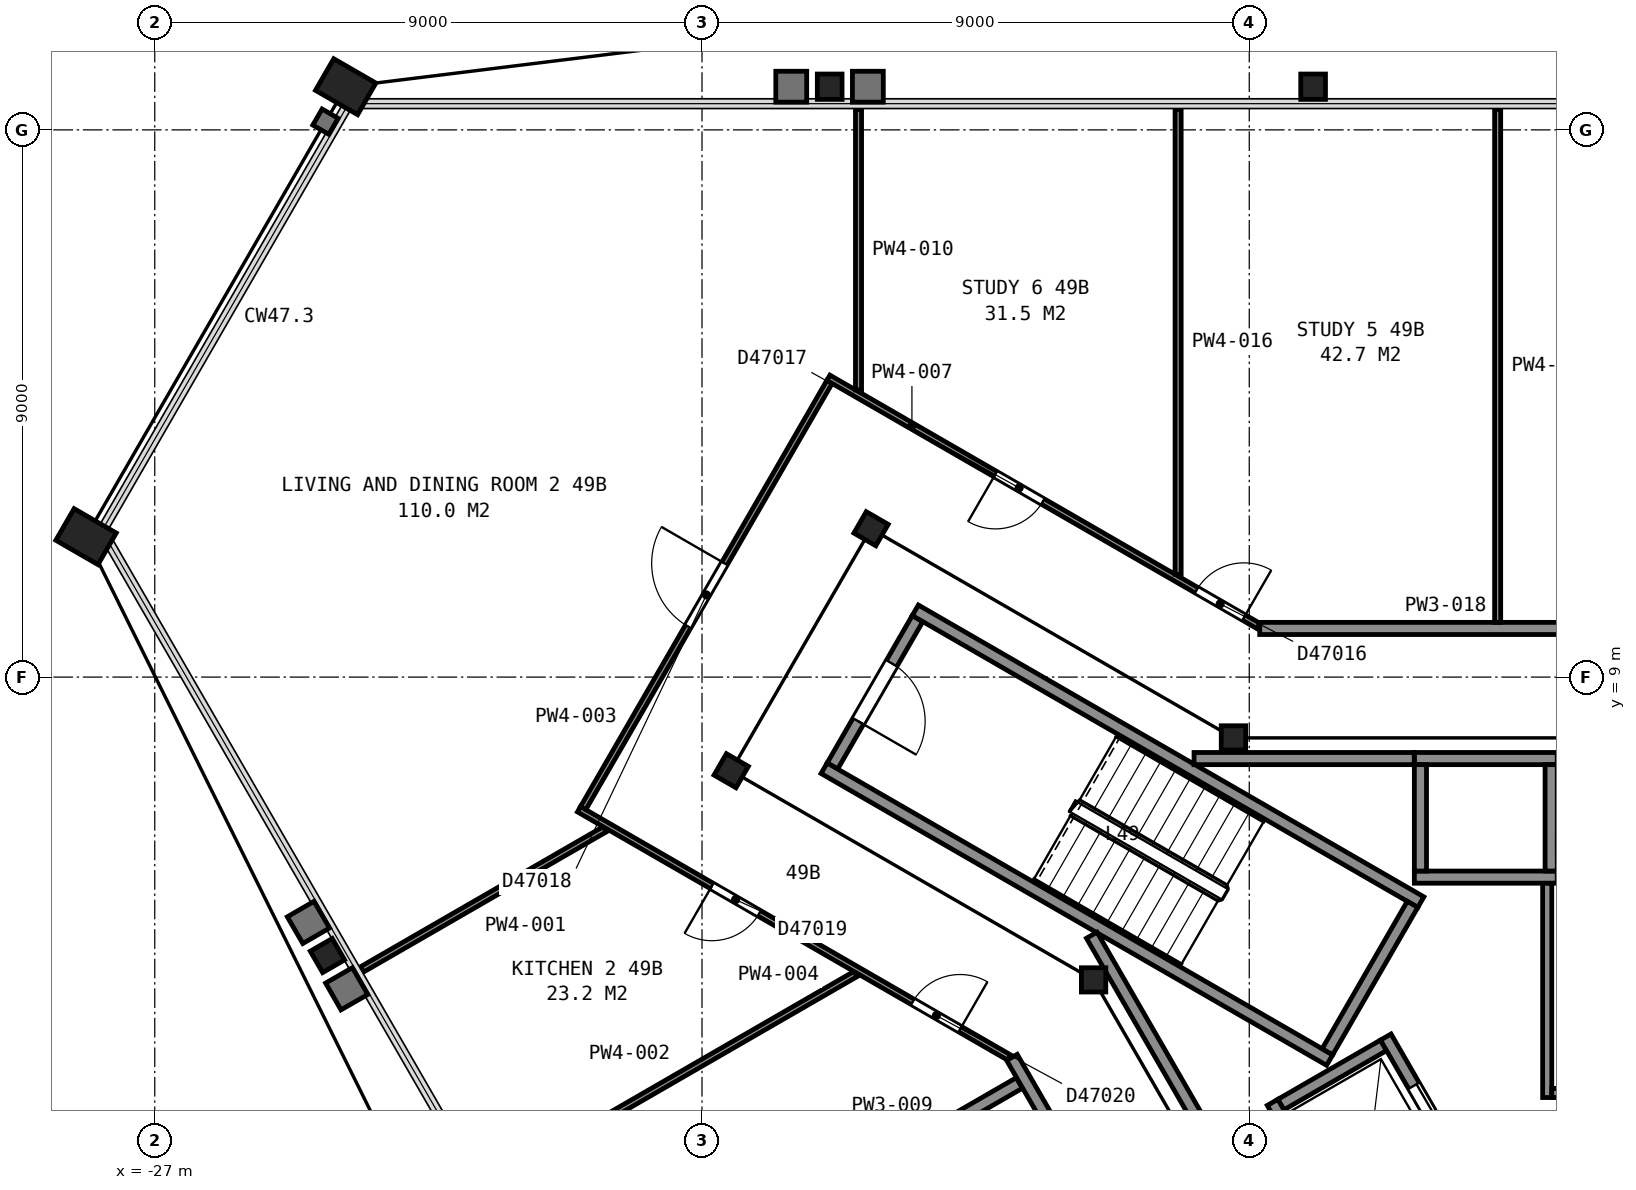
"""IFC4 building model, lengths in metres.
Left out: names, types, materials, properties, quantities, classifications, styles, units other than length and angle.
Written with IfcOpenShell. Run it as: python <this file> out.ifc"""

import sys

from ifc_helpers import new_model, si_unit, direction, frame, frame_2d, origin, origin_2d, place, context, subcontext, project, spatial, rectangle, hollow_rectangle, i_section, extrude, element, fill, save


model = new_model("IFC4")
c1 = context("Model", 3, precision=1e-05, world=origin(), true_north=direction((0.0, 1.0)))
c2 = subcontext(c1, "Body", "Model", "MODEL_VIEW")
j1 = project(units=[si_unit("LENGTHUNIT", "METRE"), si_unit("PLANEANGLEUNIT", "RADIAN")], contexts=[c1])
p1 = place(None, origin())
s1 = spatial("IfcSite", under=j1, at=p1, CompositionType="ELEMENT")
p2 = place(p1, origin())
s2 = spatial("IfcBuilding", under=s1, at=p2, CompositionType="ELEMENT")
p3 = place(p2, frame((0.0, 0.0, 196.9)))
s3 = spatial("IfcBuildingStorey", under=s2, at=p3, CompositionType="ELEMENT", Elevation=196.9)
for number, where, z_axis, x_axis in (
    (1, (-7.95, 18.71, 0.0), (0.0, 0.0, 1.0), (1.0, 0.0, 0.0)),
    (2, (-15.9, 18.71, 0.0), (0.0, 0.0, 1.0), (1.0, 0.0, 0.0)),
):
    element("IfcColumn", number, at=place(p3, frame(where, z_axis=z_axis, x_axis=x_axis)), inside=s3, PredefinedType="COLUMN", context=c2, shape_type="SweptSolid", body=[
        extrude(i_section(OverallWidth=0.406, OverallDepth=0.417, WebThickness=0.03, FlangeThickness=0.048, FilletRadius=0.015, at=origin_2d()), origin(), (0.0, 0.0, 1.0), 3.01),
    ])
for number, where, z_axis, x_axis in (
    (3, (-23.86, 18.71, 0.0), (0.0, 0.0, 1.0), (0.5, 0.866, 0.0)),
    (4, (-28.13, 11.31, 0.0), (0.0, 0.0, 1.0), (0.5, 0.866, 0.0)),
):
    element("IfcColumn", number, at=place(p3, frame(where, z_axis=z_axis, x_axis=x_axis)), inside=s3, PredefinedType="COLUMN", context=c2, shape_type="SweptSolid", body=[
        extrude(hollow_rectangle(XDim=0.6, YDim=0.8, WallThickness=0.05, at=origin_2d()), origin(), (0.0, 0.0, 1.0), 3.7),
    ])
p4 = place(p3, frame((-24.16, 4.42, 0.0), z_axis=(0.0, 0.0, 1.0), x_axis=(-0.5, 0.866025403784, 0.0)))
e5 = element("IfcColumn", 5, at=p4, inside=s3, PredefinedType="COLUMN", context=c2, shape_type="SweptSolid", body=[
    extrude(i_section(OverallWidth=0.406, OverallDepth=0.417, WebThickness=0.03, FlangeThickness=0.048, FilletRadius=0.015, at=origin_2d()), origin(), (0.0, 0.0, 1.0), 3.01),
])
p5 = place(p3, frame((-9.26, 8.0, 0.0), z_axis=(0.0, 0.0, 1.0), x_axis=(1.0, 0.0, 0.0)))
e6 = element("IfcColumn", 6, at=p5, inside=s3, PredefinedType="COLUMN", context=c2, shape_type="SweptSolid", body=[
    extrude(i_section(OverallWidth=0.401, OverallDepth=0.399, WebThickness=0.025, FlangeThickness=0.04, FilletRadius=0.015, at=origin_2d()), origin(), (0.0, 0.0, 1.0), 3.7),
])
for number, where, z_axis, x_axis in (
    (7, (-15.22, 11.44, 0.0), (0.0, 0.0, 1.0), (0.5, 0.866, 0.0)),
    (8, (-17.52, 7.46, 0.0), (0.0, 0.0, 1.0), (0.5, 0.866, 0.0)),
):
    element("IfcColumn", number, at=place(p3, frame(where, z_axis=z_axis, x_axis=x_axis)), inside=s3, PredefinedType="COLUMN", context=c2, shape_type="SweptSolid", body=[
        extrude(i_section(OverallWidth=0.406, OverallDepth=0.417, WebThickness=0.03, FlangeThickness=0.048, FilletRadius=0.015, at=origin_2d()), origin(), (0.0, 0.0, 1.0), 3.7),
    ])
p6 = place(p3, frame((-11.56, 4.02, 0.0), z_axis=(0.0, 0.0, 1.0), x_axis=(1.0, 0.0, 0.0)))
e9 = element("IfcColumn", 9, at=p6, inside=s3, PredefinedType="COLUMN", context=c2, shape_type="SweptSolid", body=[
    extrude(i_section(OverallWidth=0.401, OverallDepth=0.399, WebThickness=0.025, FlangeThickness=0.04, FilletRadius=0.015, at=origin_2d()), origin(), (0.0, 0.0, 1.0), 3.7),
])
p7 = place(p3, frame((-14.455, 9.962, 0.0), z_axis=(0.0, 0.0, 1.0), x_axis=(-0.500049511043, -0.865996816683, 0.0)))
e10 = element("IfcWall", 10, at=p7, inside=s3, PredefinedType="PARTITIONING", context=c2, shape_type="SweptSolid", body=[
    extrude(rectangle(XDim=2.8, YDim=0.2, at=frame_2d((1.4, 0.0))), origin(), (0.0, 0.0, 1.0), 3.45),
])
p8 = place(p7, frame((0.85, 0.0, 0.0)))
e11 = element("IfcOpeningElement", 11, at=p8, cuts=e10, PredefinedType="OPENING", context=c2, shape_type="SweptSolid", body=[
    extrude(rectangle(XDim=1.1, YDim=2.1, at=frame_2d((0.55, 1.05))), frame((0.0, 0.11, 0.0), z_axis=(0.0, -1.0, 0.0), x_axis=(1.0, 0.0, 0.0)), (0.0, 0.0, 1.0), 0.22),
])
for number, where, z_axis, x_axis in (
    (12, (-7.678, 2.701, 0.0), (0.0, 0.0, 1.0), (-0.866, 0.5, 0.0)),
    (13, (-6.178, 5.299, 0.0), (0.0, 0.0, 1.0), (-0.866, 0.5, 0.0)),
):
    element("IfcWall", number, at=place(p3, frame(where, z_axis=z_axis, x_axis=x_axis)), inside=s3, PredefinedType="PARTITIONING", context=c2, shape_type="SweptSolid", body=[
        extrude(rectangle(XDim=9.6, YDim=0.2, at=frame_2d((4.8, 0.0))), origin(), (0.0, 0.0, 1.0), 3.45),
    ])
p9 = place(p3, frame((-6.315, 5.262, 0.0), z_axis=(0.0, 0.0, 1.0), x_axis=(-0.500049511043, -0.865996816683, 0.0)))
e14 = element("IfcWall", 14, at=p9, inside=s3, PredefinedType="PARTITIONING", context=c2, shape_type="SweptSolid", body=[
    extrude(rectangle(XDim=2.8, YDim=0.2, at=frame_2d((1.4, 0.0))), origin(), (0.0, 0.0, 1.0), 3.45),
])
for number, where, z_axis, x_axis in (
    (15, (-6.285, 5.71, 0.0), (0.0, 0.0, 1.0), (1.0, 0.0, 0.0)),
    (16, (-6.285, 7.66, 0.0), (0.0, 0.0, 1.0), (1.0, 0.0, 0.0)),
):
    element("IfcWall", number, at=place(p3, frame(where, z_axis=z_axis, x_axis=x_axis)), inside=s3, PredefinedType="PARTITIONING", context=c2, shape_type="SweptSolid", body=[
        extrude(rectangle(XDim=2.35, YDim=0.2, at=frame_2d((1.175, 0.0))), origin(), (0.0, 0.0, 1.0), 3.7),
    ])
p10 = place(p3, frame((-8.48, 1.969, 0.0), z_axis=(0.0, 0.0, 1.0), x_axis=(0.866000020948, 0.500043961785, 0.0)))
e17 = element("IfcWall", 17, at=p10, inside=s3, PredefinedType="PARTITIONING", context=c2, shape_type="SweptSolid", body=[
    extrude(rectangle(XDim=1.95, YDim=0.2, at=frame_2d((0.975, 0.0))), origin(), (0.0, 0.0, 1.0), 3.7),
])
for number, where, z_axis, x_axis in (
    (18, (-4.035, 5.81, 0.0), (0.0, 0.0, 1.0), (0.0, 1.0, 0.0)),
    (19, (-6.185, 5.81, 0.0), (0.0, 0.0, 1.0), (0.0, 1.0, 0.0)),
):
    element("IfcWall", number, at=place(p3, frame(where, z_axis=z_axis, x_axis=x_axis)), inside=s3, PredefinedType="PARTITIONING", context=c2, shape_type="SweptSolid", body=[
        extrude(rectangle(XDim=1.75, YDim=0.2, at=frame_2d((0.875, 0.0))), origin(), (0.0, 0.0, 1.0), 3.7),
    ])
p11 = place(p3, frame((-5.28, 0.525, 0.0), z_axis=(0.0, 0.0, 1.0), x_axis=(-0.500037662692, 0.866003658127, 0.0)))
e20 = element("IfcWall", 20, at=p11, inside=s3, PredefinedType="PARTITIONING", context=c2, shape_type="SweptSolid", body=[
    extrude(rectangle(XDim=2.95, YDim=0.2, at=frame_2d((1.475, 0.0))), origin(), (0.0, 0.0, 1.0), 3.7),
])
p12 = place(p11, frame((0.925, 0.0, 0.0)))
e21 = element("IfcOpeningElement", 21, at=p12, cuts=e20, PredefinedType="OPENING", context=c2, shape_type="SweptSolid", body=[
    extrude(rectangle(XDim=1.1, YDim=2.1, at=frame_2d((0.55, 1.05))), frame((0.0, 0.11, 0.0), z_axis=(0.0, -1.0, 0.0), x_axis=(1.0, 0.0, 0.0)), (0.0, 0.0, 1.0), 0.22),
])
p13 = place(p3, frame((-7.242, -0.376, 0.0), z_axis=(0.0, 0.0, 1.0), x_axis=(-0.499996545922, 0.866027397988, 0.0)))
e22 = element("IfcWall", 22, at=p13, inside=s3, PredefinedType="PARTITIONING", context=c2, shape_type="SweptSolid", body=[
    extrude(rectangle(XDim=2.75, YDim=0.2, at=frame_2d((1.375, 0.0))), origin(), (0.0, 0.0, 1.0), 3.7),
])
p14 = place(p3, frame((-11.591, 4.755, 0.0), z_axis=(0.0, 0.0, 1.0), x_axis=(0.500043977787, -0.866000011708, 0.0)))
e23 = element("IfcWall", 23, at=p14, inside=s3, PredefinedType="PARTITIONING", context=c2, shape_type="SweptSolid", body=[
    extrude(rectangle(XDim=6.617, YDim=0.2, at=frame_2d((3.308, 0.0))), origin(), (0.0, 0.0, 1.0), 3.45),
])
p15 = place(p14, frame((3.695, 0.0, 0.0)))
e24 = element("IfcOpeningElement", 24, at=p15, cuts=e23, PredefinedType="OPENING", context=c2, shape_type="SweptSolid", body=[
    extrude(rectangle(XDim=1.8, YDim=2.1, at=frame_2d((0.9, 1.05))), frame((0.0, 0.11, 0.0), z_axis=(0.0, -1.0, 0.0), x_axis=(1.0, 0.0, 0.0)), (0.0, 0.0, 1.0), 0.22),
])
p16 = place(p3, frame((-9.908, 7.66, 0.0), z_axis=(0.0, 0.0, 1.0), x_axis=(1.0, 0.0, 0.0)))
e25 = element("IfcWall", 25, at=p16, inside=s3, PredefinedType="PARTITIONING", context=c2, shape_type="SweptSolid", body=[
    extrude(rectangle(XDim=3.621, YDim=0.2, at=frame_2d((1.811, 0.0))), origin(), (0.0, 0.0, 1.0), 3.45),
])
p17 = place(p3, frame((-4.1, 2.085, 0.0), z_axis=(0.0, 0.0, 1.0), x_axis=(0.0, 1.0, 0.0)))
e26 = element("IfcWall", 26, at=p17, inside=s3, PredefinedType="PARTITIONING", context=c2, shape_type="SweptSolid", body=[
    extrude(rectangle(XDim=3.523, YDim=0.15, at=frame_2d((1.761, 0.0))), origin(), (0.0, 0.0, 1.0), 3.45),
])
p18 = place(p3, frame((-4.025, 2.16, 0.0), z_axis=(0.0, 0.0, 1.0), x_axis=(1.0, 0.0, 0.0)))
e27 = element("IfcWall", 27, at=p18, inside=s3, PredefinedType="PARTITIONING", context=c2, shape_type="SweptSolid", body=[
    extrude(rectangle(XDim=1.238, YDim=0.15, at=frame_2d((0.619, 0.0))), origin(), (0.0, 0.0, 1.0), 3.45),
])
p19 = place(p3, frame((-23.592, 4.192, 0.0), z_axis=(0.0, 0.0, 1.0), x_axis=(0.866056775574, 0.499945658529, 0.0)))
e28 = element("IfcWall", 28, at=p19, inside=s3, PredefinedType="PARTITIONING", context=c2, shape_type="SweptSolid", body=[
    extrude(rectangle(XDim=4.608, YDim=0.1, at=frame_2d((2.304, 0.0))), origin(), (0.0, 0.0, 1.0), 2.362),
])
p20 = place(p3, frame((-21.53, 0.62, 0.0), z_axis=(0.0, 0.0, 1.0), x_axis=(0.865986079307, 0.500068105808, 0.0)))
e29 = element("IfcWall", 29, at=p20, inside=s3, PredefinedType="PARTITIONING", context=c2, shape_type="SweptSolid", body=[
    extrude(rectangle(XDim=6.99, YDim=0.1, at=frame_2d((3.495, 0.0))), origin(), (0.0, 0.0, 1.0), 2.362),
])
p21 = place(p3, frame((-19.955, 6.844, 0.0), z_axis=(0.0, 0.0, 1.0), x_axis=(0.500415732313, 0.865785247537, 0.0)))
e30 = element("IfcWall", 30, at=p21, inside=s3, PredefinedType="PARTITIONING", context=c2, shape_type="SweptSolid", body=[
    extrude(rectangle(XDim=8.097, YDim=0.1, at=frame_2d((4.049, 0.0))), origin(), (0.0, 0.0, 1.0), 2.362),
])
p22 = place(p21, frame((3.45, 0.0, 0.0)))
e31 = element("IfcOpeningElement", 31, at=p22, cuts=e30, PredefinedType="OPENING", context=c2, shape_type="SweptSolid", body=[
    extrude(rectangle(XDim=1.2, YDim=2.1, at=frame_2d((0.6, 1.05))), frame((0.0, 0.06, 0.0), z_axis=(0.0, -1.0, 0.0), x_axis=(1.0, 0.0, 0.0)), (0.0, 0.0, 1.0), 0.12),
])
p23 = place(p3, frame((-12.952, 2.744, 0.0), z_axis=(0.0, 0.0, 1.0), x_axis=(-0.86608949446, 0.499888975259, 0.0)))
e32 = element("IfcWall", 32, at=p23, inside=s3, PredefinedType="PARTITIONING", context=c2, shape_type="SweptSolid", body=[
    extrude(rectangle(XDim=8.165, YDim=0.1, at=frame_2d((4.083, 0.0))), origin(), (0.0, 0.0, 1.0), 2.362),
])
p24 = place(p23, frame((4.741, 0.0, 0.0)))
e33 = element("IfcOpeningElement", 33, at=p24, cuts=e32, PredefinedType="OPENING", context=c2, shape_type="SweptSolid", body=[
    extrude(rectangle(XDim=0.9, YDim=2.1, at=frame_2d((0.45, 1.05))), frame((0.0, 0.06, 0.0), z_axis=(0.0, -1.0, 0.0), x_axis=(1.0, 0.0, 0.0)), (0.0, 0.0, 1.0), 0.12),
])
p25 = place(p23, frame((0.928, 0.0, 0.0)))
e34 = element("IfcOpeningElement", 34, at=p25, cuts=e32, PredefinedType="OPENING", context=c2, shape_type="SweptSolid", body=[
    extrude(rectangle(XDim=0.9, YDim=2.1, at=frame_2d((0.45, 1.05))), frame((0.0, 0.06, 0.0), z_axis=(0.0, -1.0, 0.0), x_axis=(1.0, 0.0, 0.0)), (0.0, 0.0, 1.0), 0.12),
])
p26 = place(p3, frame((-15.921, 13.923, 0.0), z_axis=(0.0, 0.0, 1.0), x_axis=(0.866088973199, -0.499889878377, 0.0)))
e35 = element("IfcWall", 35, at=p26, inside=s3, PredefinedType="PARTITIONING", context=c2, shape_type="SweptSolid", body=[
    extrude(rectangle(XDim=8.163, YDim=0.1, at=frame_2d((4.082, 0.0))), origin(), (0.0, 0.0, 1.0), 2.362),
])
p27 = place(p26, frame((6.99, 0.0, 0.0)))
e36 = element("IfcOpeningElement", 36, at=p27, cuts=e35, PredefinedType="OPENING", context=c2, shape_type="SweptSolid", body=[
    extrude(rectangle(XDim=0.9, YDim=2.1, at=frame_2d((0.45, 1.05))), frame((0.0, 0.06, 0.0), z_axis=(0.0, -1.0, 0.0), x_axis=(1.0, 0.0, 0.0)), (0.0, 0.0, 1.0), 0.12),
])
p28 = place(p26, frame((3.172, 0.0, 0.0)))
e37 = element("IfcOpeningElement", 37, at=p28, cuts=e35, PredefinedType="OPENING", context=c2, shape_type="SweptSolid", body=[
    extrude(rectangle(XDim=0.9, YDim=2.1, at=frame_2d((0.45, 1.05))), frame((0.0, 0.06, 0.0), z_axis=(0.0, -1.0, 0.0), x_axis=(1.0, 0.0, 0.0)), (0.0, 0.0, 1.0), 0.12),
])
p29 = place(p3, frame((-15.589, 0.703, 0.0), z_axis=(0.0, 0.0, 1.0), x_axis=(0.86594479446, 0.500139593461, 0.0)))
e38 = element("IfcWall", 38, at=p29, inside=s3, PredefinedType="PARTITIONING", context=c2, shape_type="SweptSolid", body=[
    extrude(rectangle(XDim=3.242, YDim=0.2, at=frame_2d((1.621, 0.0))), origin(), (0.0, 0.0, 1.0), 2.362),
])
p30 = place(p3, frame((-15.426, 13.724, 0.0), z_axis=(0.0, 0.0, 1.0), x_axis=(0.0, 1.0, 0.0)))
e39 = element("IfcWall", 39, at=p30, inside=s3, PredefinedType="PARTITIONING", context=c2, shape_type="SweptSolid", body=[
    extrude(rectangle(XDim=4.611, YDim=0.1, at=frame_2d((2.306, 0.0))), origin(), (0.0, 0.0, 1.0), 2.362),
])
p31 = place(p3, frame((-4.075, -12.545, 0.0), z_axis=(0.0, 0.0, 1.0), x_axis=(-0.499999743747, 0.866025551732, 0.0)))
e40 = element("IfcWall", 40, at=p31, inside=s3, PredefinedType="PARTITIONING", context=c2, shape_type="SweptSolid", body=[
    extrude(rectangle(XDim=17.656, YDim=0.2, at=frame_2d((8.828, 0.0))), origin(), (0.0, 0.0, 1.0), 2.362),
])
p32 = place(p31, frame((10.83, 0.0, 0.0)))
e41 = element("IfcOpeningElement", 41, at=p32, cuts=e40, PredefinedType="OPENING", context=c2, shape_type="SweptSolid", body=[
    extrude(rectangle(XDim=0.9, YDim=2.1, at=frame_2d((0.45, 1.05))), frame((0.0, 0.11, 0.0), z_axis=(0.0, -1.0, 0.0), x_axis=(1.0, 0.0, 0.0)), (0.0, 0.0, 1.0), 0.22),
])
p33 = place(p31, frame((7.148, 0.0, 0.0)))
e42 = element("IfcOpeningElement", 42, at=p33, cuts=e40, PredefinedType="OPENING", context=c2, shape_type="SweptSolid", body=[
    extrude(rectangle(XDim=0.9, YDim=2.1, at=frame_2d((0.45, 1.05))), frame((0.0, 0.11, 0.0), z_axis=(0.0, -1.0, 0.0), x_axis=(1.0, 0.0, 0.0)), (0.0, 0.0, 1.0), 0.22),
])
p34 = place(p31, frame((2.198, 0.0, 0.0)))
e43 = element("IfcOpeningElement", 43, at=p34, cuts=e40, PredefinedType="OPENING", context=c2, shape_type="SweptSolid", body=[
    extrude(rectangle(XDim=0.9, YDim=2.1, at=frame_2d((0.45, 1.05))), frame((0.0, 0.11, 0.0), z_axis=(0.0, -1.0, 0.0), x_axis=(1.0, 0.0, 0.0)), (0.0, 0.0, 1.0), 0.22),
])
p35 = place(p3, frame((-10.17, 10.691, 0.0), z_axis=(0.0, 0.0, 1.0), x_axis=(0.0, 1.0, 0.0)))
e44 = element("IfcWall", 44, at=p35, inside=s3, PredefinedType="PARTITIONING", context=c2, shape_type="SweptSolid", body=[
    extrude(rectangle(XDim=7.644, YDim=0.1, at=frame_2d((3.822, 0.0))), origin(), (0.0, 0.0, 1.0), 2.362),
])
p36 = place(p3, frame((-8.828, 9.8, 0.0), z_axis=(0.0, 0.0, 1.0), x_axis=(1.0, 0.0, 0.0)))
e45 = element("IfcWall", 45, at=p36, inside=s3, PredefinedType="PARTITIONING", context=c2, shape_type="SweptSolid", body=[
    extrude(rectangle(XDim=17.706, YDim=0.2, at=frame_2d((8.853, 0.0))), origin(), (0.0, 0.0, 1.0), 2.362),
])
p37 = place(p36, frame((14.498, 0.0, 0.0)))
e46 = element("IfcOpeningElement", 46, at=p37, cuts=e45, PredefinedType="OPENING", context=c2, shape_type="SweptSolid", body=[
    extrude(rectangle(XDim=0.9, YDim=2.1, at=frame_2d((0.45, 1.05))), frame((0.0, 0.11, 0.0), z_axis=(0.0, -1.0, 0.0), x_axis=(1.0, 0.0, 0.0)), (0.0, 0.0, 1.0), 0.22),
])
p38 = place(p36, frame((10.919, 0.0, 0.0)))
e47 = element("IfcOpeningElement", 47, at=p38, cuts=e45, PredefinedType="OPENING", context=c2, shape_type="SweptSolid", body=[
    extrude(rectangle(XDim=0.9, YDim=2.1, at=frame_2d((0.45, 1.05))), frame((0.0, 0.11, 0.0), z_axis=(0.0, -1.0, 0.0), x_axis=(1.0, 0.0, 0.0)), (0.0, 0.0, 1.0), 0.22),
])
p39 = place(p36, frame((6.113, 0.0, 0.0)))
e48 = element("IfcOpeningElement", 48, at=p39, cuts=e45, PredefinedType="OPENING", context=c2, shape_type="SweptSolid", body=[
    extrude(rectangle(XDim=0.9, YDim=2.1, at=frame_2d((0.45, 1.05))), frame((0.0, 0.11, 0.0), z_axis=(0.0, -1.0, 0.0), x_axis=(1.0, 0.0, 0.0)), (0.0, 0.0, 1.0), 0.22),
])
p40 = place(p3, frame((-4.915, 9.9, 0.0), z_axis=(0.0, 0.0, 1.0), x_axis=(0.0, 1.0, 0.0)))
e49 = element("IfcWall", 49, at=p40, inside=s3, PredefinedType="PARTITIONING", context=c2, shape_type="SweptSolid", body=[
    extrude(rectangle(XDim=8.435, YDim=0.1, at=frame_2d((4.218, 0.0))), origin(), (0.0, 0.0, 1.0), 2.362),
])
p41 = place(p8, origin())
e50 = element("IfcDoor", 50, at=p41, inside=s3, OperationType="SINGLE_SWING_RIGHT", PredefinedType="DOOR", context=c2, shape_type="SweptSolid", body=[
    extrude(rectangle(XDim=1.1, YDim=2.1, at=frame_2d((0.55, 1.05))), frame((0.0, 0.025, 0.0), z_axis=(0.0, -1.0, 0.0), x_axis=(1.0, 0.0, 0.0)), (0.0, 0.0, 1.0), 0.05),
])
fill(e11, e50)
p42 = place(p12, origin())
e51 = element("IfcDoor", 51, at=p42, inside=s3, OperationType="SLIDING_TO_LEFT", PredefinedType="DOOR", context=c2, shape_type="SweptSolid", body=[
    extrude(rectangle(XDim=1.1, YDim=2.1, at=frame_2d((0.55, 1.05))), frame((0.0, 0.025, 0.0), z_axis=(0.0, -1.0, 0.0), x_axis=(1.0, 0.0, 0.0)), (0.0, 0.0, 1.0), 0.05),
])
fill(e21, e51)
p43 = place(p22, origin())
e52 = element("IfcDoor", 52, at=p43, inside=s3, OperationType="SINGLE_SWING_RIGHT", PredefinedType="DOOR", context=c2, shape_type="SweptSolid", body=[
    extrude(rectangle(XDim=1.2, YDim=2.1, at=frame_2d((0.6, 1.05))), frame((0.0, 0.025, 0.0), z_axis=(0.0, -1.0, 0.0), x_axis=(1.0, 0.0, 0.0)), (0.0, 0.0, 1.0), 0.05),
])
fill(e31, e52)
p44 = place(p24, origin())
e53 = element("IfcDoor", 53, at=p44, inside=s3, OperationType="SINGLE_SWING_RIGHT", PredefinedType="DOOR", context=c2, shape_type="SweptSolid", body=[
    extrude(rectangle(XDim=0.9, YDim=2.1, at=frame_2d((0.45, 1.05))), frame((0.0, 0.025, 0.0), z_axis=(0.0, -1.0, 0.0), x_axis=(1.0, 0.0, 0.0)), (0.0, 0.0, 1.0), 0.05),
])
fill(e33, e53)
p45 = place(p25, origin())
e54 = element("IfcDoor", 54, at=p45, inside=s3, OperationType="SINGLE_SWING_LEFT", PredefinedType="DOOR", context=c2, shape_type="SweptSolid", body=[
    extrude(rectangle(XDim=0.9, YDim=2.1, at=frame_2d((0.45, 1.05))), frame((0.0, 0.025, 0.0), z_axis=(0.0, -1.0, 0.0), x_axis=(1.0, 0.0, 0.0)), (0.0, 0.0, 1.0), 0.05),
])
fill(e34, e54)
p46 = place(p27, origin())
e55 = element("IfcDoor", 55, at=p46, inside=s3, OperationType="SINGLE_SWING_RIGHT", PredefinedType="DOOR", context=c2, shape_type="SweptSolid", body=[
    extrude(rectangle(XDim=0.9, YDim=2.1, at=frame_2d((0.45, 1.05))), frame((0.0, 0.025, 0.0), z_axis=(0.0, -1.0, 0.0), x_axis=(1.0, 0.0, 0.0)), (0.0, 0.0, 1.0), 0.05),
])
fill(e36, e55)
p47 = place(p28, origin())
e56 = element("IfcDoor", 56, at=p47, inside=s3, OperationType="SINGLE_SWING_LEFT", PredefinedType="DOOR", context=c2, shape_type="SweptSolid", body=[
    extrude(rectangle(XDim=0.9, YDim=2.1, at=frame_2d((0.45, 1.05))), frame((0.0, 0.025, 0.0), z_axis=(0.0, -1.0, 0.0), x_axis=(1.0, 0.0, 0.0)), (0.0, 0.0, 1.0), 0.05),
])
fill(e37, e56)
save(model, sys.argv[1])
